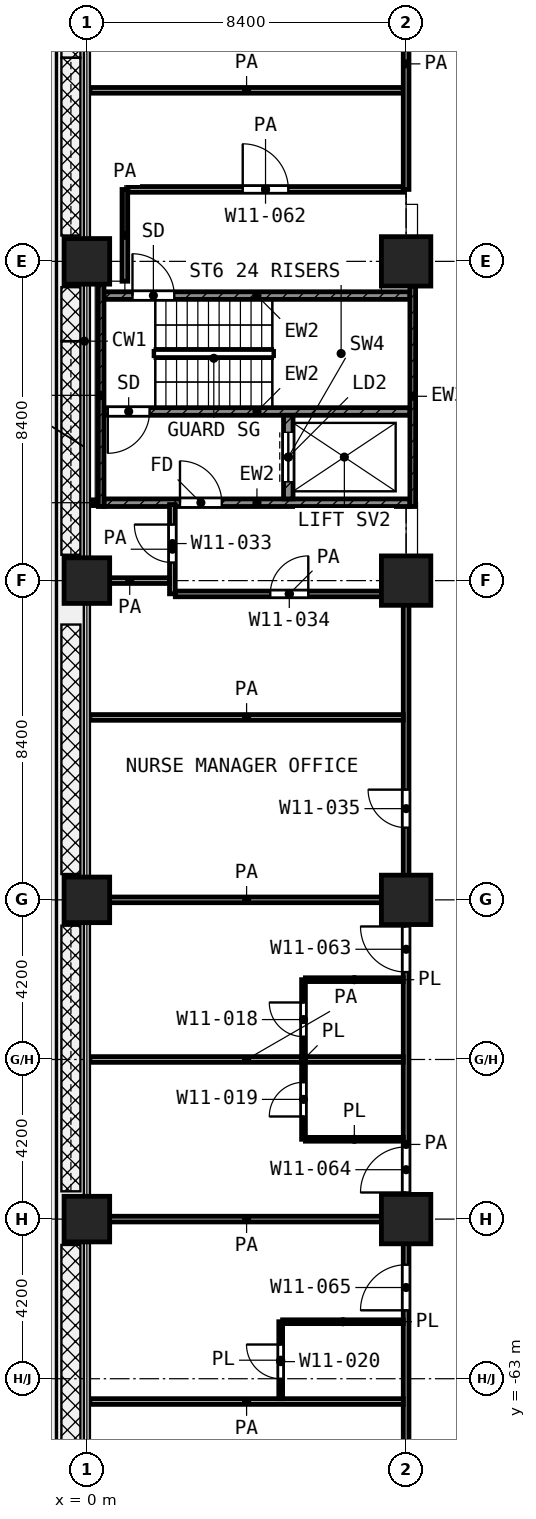
"""IFC4 building model, lengths in metres.
Left out: names, types, materials, properties, quantities, classifications, styles, units other than length and angle.
Written with IfcOpenShell. Run it as: python <this file> out.ifc"""

import sys

from ifc_helpers import new_model, si_unit, direction, frame, frame_2d, origin, origin_2d, place, context, subcontext, project, spatial, rectangle, extrude, element, fill, save


model = new_model("IFC4")
c1 = context("Model", 3, precision=1e-05, world=origin(), true_north=direction((0.0, 1.0)))
c2 = subcontext(c1, "Body", "Model", "MODEL_VIEW")
j1 = project(units=[si_unit("LENGTHUNIT", "METRE"), si_unit("PLANEANGLEUNIT", "RADIAN")], contexts=[c1])
p1 = place(None, origin())
s1 = spatial("IfcSite", under=j1, at=p1, CompositionType="ELEMENT")
p2 = place(p1, origin())
s2 = spatial("IfcBuilding", under=s1, at=p2, CompositionType="ELEMENT")
p3 = place(p2, frame((0.0, 0.0, 72.8)))
s3 = spatial("IfcBuildingStorey", under=s2, at=p3, CompositionType="ELEMENT", Elevation=72.8)
p4 = place(p3, frame((0.0, -33.6, 0.0), z_axis=(0.0, 0.0, 1.0), x_axis=(1.0, 0.0, 0.0)))
e1 = element("IfcColumn", 1, at=p4, inside=s3, PredefinedType="COLUMN", context=c2, shape_type="SweptSolid", body=[
    extrude(rectangle(XDim=1.2, YDim=1.2, at=origin_2d()), origin(), (0.0, 0.0, 1.0), 4.2),
])
p5 = place(p3, frame((8.4, -33.6, 0.0), z_axis=(0.0, 0.0, 1.0), x_axis=(1.0, 0.0, 0.0)))
e2 = element("IfcColumn", 2, at=p5, inside=s3, PredefinedType="COLUMN", context=c2, shape_type="SweptSolid", body=[
    extrude(rectangle(XDim=1.3, YDim=1.3, at=origin_2d()), origin(), (0.0, 0.0, 1.0), 4.2),
])
p6 = place(p3, frame((0.0, -42.0, 0.0), z_axis=(0.0, 0.0, 1.0), x_axis=(1.0, 0.0, 0.0)))
e3 = element("IfcColumn", 3, at=p6, inside=s3, PredefinedType="COLUMN", context=c2, shape_type="SweptSolid", body=[
    extrude(rectangle(XDim=1.2, YDim=1.2, at=origin_2d()), origin(), (0.0, 0.0, 1.0), 4.2),
])
p7 = place(p3, frame((8.4, -42.0, 0.0), z_axis=(0.0, 0.0, 1.0), x_axis=(1.0, 0.0, 0.0)))
e4 = element("IfcColumn", 4, at=p7, inside=s3, PredefinedType="COLUMN", context=c2, shape_type="SweptSolid", body=[
    extrude(rectangle(XDim=1.3, YDim=1.3, at=origin_2d()), origin(), (0.0, 0.0, 1.0), 4.2),
])
p8 = place(p3, frame((0.0, -50.4, 0.0), z_axis=(0.0, 0.0, 1.0), x_axis=(1.0, 0.0, 0.0)))
e5 = element("IfcColumn", 5, at=p8, inside=s3, PredefinedType="COLUMN", context=c2, shape_type="SweptSolid", body=[
    extrude(rectangle(XDim=1.2, YDim=1.2, at=origin_2d()), origin(), (0.0, 0.0, 1.0), 4.2),
])
p9 = place(p3, frame((8.4, -50.4, 0.0), z_axis=(0.0, 0.0, 1.0), x_axis=(1.0, 0.0, 0.0)))
e6 = element("IfcColumn", 6, at=p9, inside=s3, PredefinedType="COLUMN", context=c2, shape_type="SweptSolid", body=[
    extrude(rectangle(XDim=1.3, YDim=1.3, at=origin_2d()), origin(), (0.0, 0.0, 1.0), 4.2),
])
p10 = place(p3, frame((0.0, -58.8, 0.0), z_axis=(0.0, 0.0, 1.0), x_axis=(1.0, 0.0, 0.0)))
e7 = element("IfcColumn", 7, at=p10, inside=s3, PredefinedType="COLUMN", context=c2, shape_type="SweptSolid", body=[
    extrude(rectangle(XDim=1.2, YDim=1.2, at=origin_2d()), origin(), (0.0, 0.0, 1.0), 4.2),
])
p11 = place(p3, frame((8.4, -58.8, 0.0), z_axis=(0.0, 0.0, 1.0), x_axis=(1.0, 0.0, 0.0)))
e8 = element("IfcColumn", 8, at=p11, inside=s3, PredefinedType="COLUMN", context=c2, shape_type="SweptSolid", body=[
    extrude(rectangle(XDim=1.3, YDim=1.3, at=origin_2d()), origin(), (0.0, 0.0, 1.0), 4.2),
])
p12 = place(p3, frame((0.375, -40.05, 0.0), z_axis=(0.0, 0.0, 1.0), x_axis=(0.0, 1.0, 0.0)))
e9 = element("IfcWall", 9, at=p12, inside=s3, PredefinedType="SHEAR", context=c2, shape_type="SweptSolid", body=[
    extrude(rectangle(XDim=5.85, YDim=0.15, at=frame_2d((2.925, 0.0))), origin(), (0.0, 0.0, 1.0), 3.9),
])
p13 = place(p3, frame((8.575, -40.05, 0.0), z_axis=(0.0, 0.0, 1.0), x_axis=(0.0, 1.0, 0.0)))
e10 = element("IfcWall", 10, at=p13, inside=s3, PredefinedType="SHEAR", context=c2, shape_type="SweptSolid", body=[
    extrude(rectangle(XDim=5.8, YDim=0.15, at=frame_2d((2.9, 0.0))), origin(), (0.0, 0.0, 1.0), 3.9),
])
p14 = place(p3, frame((0.45, -34.5, 0.0), z_axis=(0.0, 0.0, 1.0), x_axis=(1.0, 0.0, 0.0)))
e11 = element("IfcWall", 11, at=p14, inside=s3, PredefinedType="SHEAR", context=c2, shape_type="SweptSolid", body=[
    extrude(rectangle(XDim=8.05, YDim=0.2, at=frame_2d((4.025, 0.0))), origin(), (0.0, 0.0, 1.0), 3.9),
])
p15 = place(p14, frame((0.75, 0.0, 0.0)))
e12 = element("IfcOpeningElement", 12, at=p15, cuts=e11, PredefinedType="OPENING", context=c2, shape_type="SweptSolid", body=[
    extrude(rectangle(XDim=1.1, YDim=2.1, at=frame_2d((0.55, 1.05))), frame((0.0, 0.11, 0.0), z_axis=(0.0, -1.0, 0.0), x_axis=(1.0, 0.0, 0.0)), (0.0, 0.0, 1.0), 0.22),
])
p16 = place(p3, frame((0.45, -37.55, 0.0), z_axis=(0.0, 0.0, 1.0), x_axis=(1.0, 0.0, 0.0)))
e13 = element("IfcWall", 13, at=p16, inside=s3, PredefinedType="SHEAR", context=c2, shape_type="SweptSolid", body=[
    extrude(rectangle(XDim=8.05, YDim=0.2, at=frame_2d((4.025, 0.0))), origin(), (0.0, 0.0, 1.0), 3.9),
])
p17 = place(p16, frame((0.1, 0.0, 0.0)))
e14 = element("IfcOpeningElement", 14, at=p17, cuts=e13, PredefinedType="OPENING", context=c2, shape_type="SweptSolid", body=[
    extrude(rectangle(XDim=1.1, YDim=2.1, at=frame_2d((0.55, 1.05))), frame((0.0, 0.11, 0.0), z_axis=(0.0, -1.0, 0.0), x_axis=(1.0, 0.0, 0.0)), (0.0, 0.0, 1.0), 0.22),
])
p18 = place(p3, frame((0.45, -39.95, 0.0), z_axis=(0.0, 0.0, 1.0), x_axis=(1.0, 0.0, 0.0)))
e15 = element("IfcWall", 15, at=p18, inside=s3, PredefinedType="SHEAR", context=c2, shape_type="SweptSolid", body=[
    extrude(rectangle(XDim=8.05, YDim=0.2, at=frame_2d((4.025, 0.0))), origin(), (0.0, 0.0, 1.0), 3.9),
])
p19 = place(p18, frame((2.0, 0.0, 0.0)))
e16 = element("IfcOpeningElement", 16, at=p19, cuts=e15, PredefinedType="OPENING", context=c2, shape_type="SweptSolid", body=[
    extrude(rectangle(XDim=1.1, YDim=2.1, at=frame_2d((0.55, 1.05))), frame((0.0, 0.11, 0.0), z_axis=(0.0, -1.0, 0.0), x_axis=(1.0, 0.0, 0.0)), (0.0, 0.0, 1.0), 0.22),
])
p20 = place(p3, frame((5.3, -39.85, 0.0), z_axis=(0.0, 0.0, 1.0), x_axis=(0.0, 1.0, 0.0)))
e17 = element("IfcWall", 17, at=p20, inside=s3, PredefinedType="SHEAR", context=c2, shape_type="SweptSolid", body=[
    extrude(rectangle(XDim=2.2, YDim=0.25, at=frame_2d((1.1, 0.0))), origin(), (0.0, 0.0, 1.0), 3.9),
])
p21 = place(p20, frame((0.45, 0.0, 0.0)))
e18 = element("IfcOpeningElement", 18, at=p21, cuts=e17, PredefinedType="OPENING", context=c2, shape_type="SweptSolid", body=[
    extrude(rectangle(XDim=1.3, YDim=2.1, at=frame_2d((0.65, 1.05))), frame((0.0, 0.135, 0.0), z_axis=(0.0, -1.0, 0.0), x_axis=(1.0, 0.0, 0.0)), (0.0, 0.0, 1.0), 0.27),
])
p22 = place(p3, frame((5.15, -61.5, 0.0), z_axis=(0.0, 0.0, 1.0), x_axis=(1.0, 0.0, 0.0)))
e19 = element("IfcWall", 19, at=p22, inside=s3, PredefinedType="PARTITIONING", context=c2, shape_type="SweptSolid", body=[
    extrude(rectangle(XDim=3.175, YDim=0.1, at=frame_2d((1.587, 0.0))), origin(), (0.0, 0.0, 1.0), 3.9),
])
for number, where, z_axis, x_axis in (
    (20, (5.75, -56.7, 0.0), (0.0, 0.0, 1.0), (1.0, 0.0, 0.0)),
    (21, (5.75, -52.5, 0.0), (0.0, 0.0, 1.0), (1.0, 0.0, 0.0)),
):
    element("IfcWall", number, at=place(p3, frame(where, z_axis=z_axis, x_axis=x_axis)), inside=s3, PredefinedType="PARTITIONING", context=c2, shape_type="SweptSolid", body=[
        extrude(rectangle(XDim=2.575, YDim=0.1, at=frame_2d((1.288, 0.0))), origin(), (0.0, 0.0, 1.0), 3.9),
    ])
p23 = place(p3, frame((5.1, -63.525, 0.0), z_axis=(0.0, 0.0, 1.0), x_axis=(0.0, 1.0, 0.0)))
e22 = element("IfcWall", 22, at=p23, inside=s3, PredefinedType="PARTITIONING", context=c2, shape_type="SweptSolid", body=[
    extrude(rectangle(XDim=2.025, YDim=0.1, at=frame_2d((1.012, 0.0))), origin(), (0.0, 0.0, 1.0), 3.9),
])
p24 = place(p23, frame((0.525, 0.0, 0.0)))
e23 = element("IfcOpeningElement", 23, at=p24, cuts=e22, PredefinedType="OPENING", context=c2, shape_type="SweptSolid", body=[
    extrude(rectangle(XDim=0.9, YDim=2.1, at=frame_2d((0.45, 1.05))), frame((0.0, 0.06, 0.0), z_axis=(0.0, -1.0, 0.0), x_axis=(1.0, 0.0, 0.0)), (0.0, 0.0, 1.0), 0.12),
])
p25 = place(p3, frame((5.7, -56.7, 0.0), z_axis=(0.0, 0.0, 1.0), x_axis=(0.0, 1.0, 0.0)))
e24 = element("IfcWall", 24, at=p25, inside=s3, PredefinedType="PARTITIONING", context=c2, shape_type="SweptSolid", body=[
    extrude(rectangle(XDim=4.2, YDim=0.1, at=frame_2d((2.1, 0.0))), origin(), (0.0, 0.0, 1.0), 3.9),
])
p26 = place(p25, frame((2.7, 0.0, 0.0)))
e25 = element("IfcOpeningElement", 25, at=p26, cuts=e24, PredefinedType="OPENING", context=c2, shape_type="SweptSolid", body=[
    extrude(rectangle(XDim=0.9, YDim=2.1, at=frame_2d((0.45, 1.05))), frame((0.0, 0.06, 0.0), z_axis=(0.0, -1.0, 0.0), x_axis=(1.0, 0.0, 0.0)), (0.0, 0.0, 1.0), 0.12),
])
p27 = place(p25, frame((0.6, 0.0, 0.0)))
e26 = element("IfcOpeningElement", 26, at=p27, cuts=e24, PredefinedType="OPENING", context=c2, shape_type="SweptSolid", body=[
    extrude(rectangle(XDim=0.9, YDim=2.1, at=frame_2d((0.45, 1.05))), frame((0.0, 0.06, 0.0), z_axis=(0.0, -1.0, 0.0), x_axis=(1.0, 0.0, 0.0)), (0.0, 0.0, 1.0), 0.12),
])
for number, where, z_axis, x_axis in (
    (27, (0.08, -63.6, 0.0), (0.0, 0.0, 1.0), (1.0, 0.0, 0.0)),
    (28, (0.08, -58.8, 0.0), (0.0, 0.0, 1.0), (1.0, 0.0, 0.0)),
    (29, (0.08, -54.6, 0.0), (0.0, 0.0, 1.0), (1.0, 0.0, 0.0)),
    (30, (0.08, -50.4, 0.0), (0.0, 0.0, 1.0), (1.0, 0.0, 0.0)),
    (31, (0.08, -45.6, 0.0), (0.0, 0.0, 1.0), (1.0, 0.0, 0.0)),
):
    element("IfcWall", number, at=place(p3, frame(where, z_axis=z_axis, x_axis=x_axis)), inside=s3, PredefinedType="PARTITIONING", context=c2, shape_type="SweptSolid", body=[
        extrude(rectangle(XDim=8.245, YDim=0.15, at=frame_2d((4.123, 0.0))), origin(), (0.0, 0.0, 1.0), 3.9),
    ])
p28 = place(p3, frame((2.327, -42.35, 0.0), z_axis=(0.0, 0.0, 1.0), x_axis=(1.0, 0.0, 0.0)))
e32 = element("IfcWall", 32, at=p28, inside=s3, PredefinedType="PARTITIONING", context=c2, shape_type="SweptSolid", body=[
    extrude(rectangle(XDim=5.998, YDim=0.15, at=frame_2d((2.999, 0.0))), origin(), (0.0, 0.0, 1.0), 3.9),
])
p29 = place(p28, frame((2.499, 0.0, 0.0)))
e33 = element("IfcOpeningElement", 33, at=p29, cuts=e32, PredefinedType="OPENING", context=c2, shape_type="SweptSolid", body=[
    extrude(rectangle(XDim=1.0, YDim=2.1, at=frame_2d((0.5, 1.05))), frame((0.0, 0.085, 0.0), z_axis=(0.0, -1.0, 0.0), x_axis=(1.0, 0.0, 0.0)), (0.0, 0.0, 1.0), 0.17),
])
p30 = place(p3, frame((0.08, -42.0, 0.0), z_axis=(0.0, 0.0, 1.0), x_axis=(1.0, 0.0, 0.0)))
e34 = element("IfcWall", 34, at=p30, inside=s3, PredefinedType="PARTITIONING", context=c2, shape_type="SweptSolid", body=[
    extrude(rectangle(XDim=2.095, YDim=0.15, at=frame_2d((1.047, 0.0))), origin(), (0.0, 0.0, 1.0), 3.9),
])
p31 = place(p3, frame((0.08, -39.95, 0.0), z_axis=(0.0, 0.0, 1.0), x_axis=(1.0, 0.0, 0.0)))
e35 = element("IfcWall", 35, at=p31, inside=s3, PredefinedType="PARTITIONING", context=c2, shape_type="SweptSolid", body=[
    extrude(rectangle(XDim=0.19, YDim=0.15, at=frame_2d((0.095, 0.0))), origin(), (0.0, 0.0, 1.0), 3.9),
])
p32 = place(p3, frame((1.077, -31.707, 0.0), z_axis=(0.0, 0.0, 1.0), x_axis=(1.0, 0.0, 0.0)))
e36 = element("IfcWall", 36, at=p32, inside=s3, PredefinedType="PARTITIONING", context=c2, shape_type="SweptSolid", body=[
    extrude(rectangle(XDim=7.248, YDim=0.15, at=frame_2d((3.624, 0.0))), origin(), (0.0, 0.0, 1.0), 3.9),
])
p33 = place(p32, frame((3.024, 0.0, 0.0)))
e37 = element("IfcOpeningElement", 37, at=p33, cuts=e36, PredefinedType="OPENING", context=c2, shape_type="SweptSolid", body=[
    extrude(rectangle(XDim=1.2, YDim=2.1, at=frame_2d((0.6, 1.05))), frame((0.0, 0.085, 0.0), z_axis=(0.0, -1.0, 0.0), x_axis=(1.0, 0.0, 0.0)), (0.0, 0.0, 1.0), 0.17),
])
p34 = place(p3, frame((0.08, -29.1, 0.0), z_axis=(0.0, 0.0, 1.0), x_axis=(1.0, 0.0, 0.0)))
e38 = element("IfcWall", 38, at=p34, inside=s3, PredefinedType="PARTITIONING", context=c2, shape_type="SweptSolid", body=[
    extrude(rectangle(XDim=8.245, YDim=0.15, at=frame_2d((4.123, 0.0))), origin(), (0.0, 0.0, 1.0), 3.9),
])
p35 = place(p3, frame((1.0, -34.123, 0.0), z_axis=(0.0, 0.0, 1.0), x_axis=(0.0, 1.0, 0.0)))
e39 = element("IfcWall", 39, at=p35, inside=s3, PredefinedType="PARTITIONING", context=c2, shape_type="SweptSolid", body=[
    extrude(rectangle(XDim=2.415, YDim=0.15, at=frame_2d((1.208, 0.0))), origin(), (0.0, 0.0, 1.0), 3.9),
])
p36 = place(p3, frame((2.25, -42.348, 0.0), z_axis=(0.0, 0.0, 1.0), x_axis=(0.0, 1.0, 0.0)))
e40 = element("IfcWall", 40, at=p36, inside=s3, PredefinedType="PARTITIONING", context=c2, shape_type="SweptSolid", body=[
    extrude(rectangle(XDim=2.348, YDim=0.15, at=frame_2d((1.174, 0.0))), origin(), (0.0, 0.0, 1.0), 3.9),
])
p37 = place(p36, frame((0.823, 0.0, 0.0)))
e41 = element("IfcOpeningElement", 41, at=p37, cuts=e40, PredefinedType="OPENING", context=c2, shape_type="SweptSolid", body=[
    extrude(rectangle(XDim=1.0, YDim=2.1, at=frame_2d((0.5, 1.05))), frame((0.0, 0.085, 0.0), z_axis=(0.0, -1.0, 0.0), x_axis=(1.0, 0.0, 0.0)), (0.0, 0.0, 1.0), 0.17),
])
p38 = place(p3, frame((8.4, -71.32, 0.0), z_axis=(0.0, 0.0, 1.0), x_axis=(0.0, 1.0, 0.0)))
e42 = element("IfcWall", 42, at=p38, inside=s3, PredefinedType="PARTITIONING", context=c2, shape_type="SweptSolid", body=[
    extrude(rectangle(XDim=28.97, YDim=0.15, at=frame_2d((14.485, 0.0))), origin(), (0.0, 0.0, 1.0), 3.9),
])
p39 = place(p38, frame((22.82, 0.0, 0.0)))
e43 = element("IfcOpeningElement", 43, at=p39, cuts=e42, PredefinedType="OPENING", context=c2, shape_type="SweptSolid", body=[
    extrude(rectangle(XDim=1.0, YDim=2.1, at=frame_2d((0.5, 1.05))), frame((0.0, 0.085, 0.0), z_axis=(0.0, -1.0, 0.0), x_axis=(1.0, 0.0, 0.0)), (0.0, 0.0, 1.0), 0.17),
])
p40 = place(p38, frame((19.02, 0.0, 0.0)))
e44 = element("IfcOpeningElement", 44, at=p40, cuts=e42, PredefinedType="OPENING", context=c2, shape_type="SweptSolid", body=[
    extrude(rectangle(XDim=1.2, YDim=2.1, at=frame_2d((0.6, 1.05))), frame((0.0, 0.085, 0.0), z_axis=(0.0, -1.0, 0.0), x_axis=(1.0, 0.0, 0.0)), (0.0, 0.0, 1.0), 0.17),
])
p41 = place(p38, frame((13.22, 0.0, 0.0)))
e45 = element("IfcOpeningElement", 45, at=p41, cuts=e42, PredefinedType="OPENING", context=c2, shape_type="SweptSolid", body=[
    extrude(rectangle(XDim=1.2, YDim=2.1, at=frame_2d((0.6, 1.05))), frame((0.0, 0.085, 0.0), z_axis=(0.0, -1.0, 0.0), x_axis=(1.0, 0.0, 0.0)), (0.0, 0.0, 1.0), 0.17),
])
p42 = place(p38, frame((10.12, 0.0, 0.0)))
e46 = element("IfcOpeningElement", 46, at=p42, cuts=e42, PredefinedType="OPENING", context=c2, shape_type="SweptSolid", body=[
    extrude(rectangle(XDim=1.2, YDim=2.1, at=frame_2d((0.6, 1.05))), frame((0.0, 0.085, 0.0), z_axis=(0.0, -1.0, 0.0), x_axis=(1.0, 0.0, 0.0)), (0.0, 0.0, 1.0), 0.17),
])
p43 = place(p38, frame((2.42, 0.0, 0.0)))
e47 = element("IfcOpeningElement", 47, at=p43, cuts=e42, PredefinedType="OPENING", context=c2, shape_type="SweptSolid", body=[
    extrude(rectangle(XDim=1.0, YDim=2.1, at=frame_2d((0.5, 1.05))), frame((0.0, 0.085, 0.0), z_axis=(0.0, -1.0, 0.0), x_axis=(1.0, 0.0, 0.0)), (0.0, 0.0, 1.0), 0.17),
])
p44 = place(p3, frame((8.4, -31.707, 0.0), z_axis=(0.0, 0.0, 1.0), x_axis=(0.0, 1.0, 0.0)))
e48 = element("IfcWall", 48, at=p44, inside=s3, PredefinedType="PARTITIONING", context=c2, shape_type="SweptSolid", body=[
    extrude(rectangle(XDim=6.607, YDim=0.15, at=frame_2d((3.303, 0.0))), origin(), (0.0, 0.0, 1.0), 3.9),
])
p45 = place(p44, frame((4.107, 0.0, 0.0)))
e49 = element("IfcOpeningElement", 49, at=p45, cuts=e48, PredefinedType="OPENING", context=c2, shape_type="SweptSolid", body=[
    extrude(rectangle(XDim=0.9, YDim=2.1, at=frame_2d((0.45, 1.05))), frame((0.0, 0.085, 0.0), z_axis=(0.0, -1.0, 0.0), x_axis=(1.0, 0.0, 0.0)), (0.0, 0.0, 1.0), 0.17),
])
p46 = place(p15, origin())
e50 = element("IfcDoor", 50, at=p46, inside=s3, OperationType="SINGLE_SWING_LEFT", PredefinedType="DOOR", context=c2, shape_type="SweptSolid", body=[
    extrude(rectangle(XDim=1.1, YDim=2.1, at=frame_2d((0.55, 1.05))), frame((0.0, 0.025, 0.0), z_axis=(0.0, -1.0, 0.0), x_axis=(1.0, 0.0, 0.0)), (0.0, 0.0, 1.0), 0.05),
])
fill(e12, e50)
p47 = place(p17, frame((1.1, 0.0, 0.0), z_axis=(0.0, 0.0, 1.0), x_axis=(-1.0, 0.0, 0.0)))
e51 = element("IfcDoor", 51, at=p47, inside=s3, OperationType="SINGLE_SWING_LEFT", PredefinedType="DOOR", context=c2, shape_type="SweptSolid", body=[
    extrude(rectangle(XDim=1.1, YDim=2.1, at=frame_2d((0.55, 1.05))), frame((0.0, 0.025, 0.0), z_axis=(0.0, -1.0, 0.0), x_axis=(1.0, 0.0, 0.0)), (0.0, 0.0, 1.0), 0.05),
])
fill(e14, e51)
p48 = place(p21, origin())
e52 = element("IfcDoor", 52, at=p48, inside=s3, OperationType="DOUBLE_DOOR_SLIDING", PredefinedType="DOOR", context=c2, shape_type="SweptSolid", body=[
    extrude(rectangle(XDim=1.3, YDim=2.1, at=frame_2d((0.65, 1.05))), frame((0.0, 0.025, 0.0), z_axis=(0.0, -1.0, 0.0), x_axis=(1.0, 0.0, 0.0)), (0.0, 0.0, 1.0), 0.05),
])
fill(e18, e52)
p49 = place(p19, origin())
e53 = element("IfcDoor", 53, at=p49, inside=s3, OperationType="SINGLE_SWING_LEFT", PredefinedType="DOOR", context=c2, shape_type="SweptSolid", body=[
    extrude(rectangle(XDim=1.1, YDim=2.1, at=frame_2d((0.55, 1.05))), frame((0.0, 0.025, 0.0), z_axis=(0.0, -1.0, 0.0), x_axis=(1.0, 0.0, 0.0)), (0.0, 0.0, 1.0), 0.05),
])
fill(e16, e53)
p50 = place(p33, origin())
e54 = element("IfcDoor", 54, at=p50, inside=s3, OperationType="SINGLE_SWING_LEFT", PredefinedType="DOOR", context=c2, shape_type="SweptSolid", body=[
    extrude(rectangle(XDim=1.2, YDim=2.1, at=frame_2d((0.6, 1.05))), frame((0.0, 0.025, 0.0), z_axis=(0.0, -1.0, 0.0), x_axis=(1.0, 0.0, 0.0)), (0.0, 0.0, 1.0), 0.05),
])
fill(e37, e54)
p51 = place(p37, origin())
e55 = element("IfcDoor", 55, at=p51, inside=s3, OperationType="SINGLE_SWING_RIGHT", PredefinedType="DOOR", context=c2, shape_type="SweptSolid", body=[
    extrude(rectangle(XDim=1.0, YDim=2.1, at=frame_2d((0.5, 1.05))), frame((0.0, 0.025, 0.0), z_axis=(0.0, -1.0, 0.0), x_axis=(1.0, 0.0, 0.0)), (0.0, 0.0, 1.0), 0.05),
])
fill(e41, e55)
p52 = place(p29, origin())
e56 = element("IfcDoor", 56, at=p52, inside=s3, OperationType="SINGLE_SWING_RIGHT", PredefinedType="DOOR", context=c2, shape_type="SweptSolid", body=[
    extrude(rectangle(XDim=1.0, YDim=2.1, at=frame_2d((0.5, 1.05))), frame((0.0, 0.025, 0.0), z_axis=(0.0, -1.0, 0.0), x_axis=(1.0, 0.0, 0.0)), (0.0, 0.0, 1.0), 0.05),
])
fill(e33, e56)
p53 = place(p39, origin())
e57 = element("IfcDoor", 57, at=p53, inside=s3, OperationType="SINGLE_SWING_RIGHT", PredefinedType="DOOR", context=c2, shape_type="SweptSolid", body=[
    extrude(rectangle(XDim=1.0, YDim=2.1, at=frame_2d((0.5, 1.05))), frame((0.0, 0.025, 0.0), z_axis=(0.0, -1.0, 0.0), x_axis=(1.0, 0.0, 0.0)), (0.0, 0.0, 1.0), 0.05),
])
fill(e43, e57)
p54 = place(p40, origin())
e58 = element("IfcDoor", 58, at=p54, inside=s3, OperationType="SINGLE_SWING_RIGHT", PredefinedType="DOOR", context=c2, shape_type="SweptSolid", body=[
    extrude(rectangle(XDim=1.2, YDim=2.1, at=frame_2d((0.6, 1.05))), frame((0.0, 0.025, 0.0), z_axis=(0.0, -1.0, 0.0), x_axis=(1.0, 0.0, 0.0)), (0.0, 0.0, 1.0), 0.05),
])
fill(e44, e58)
p55 = place(p26, origin())
e59 = element("IfcDoor", 59, at=p55, inside=s3, OperationType="SINGLE_SWING_RIGHT", PredefinedType="DOOR", context=c2, shape_type="SweptSolid", body=[
    extrude(rectangle(XDim=0.9, YDim=2.1, at=frame_2d((0.45, 1.05))), frame((0.0, 0.025, 0.0), z_axis=(0.0, -1.0, 0.0), x_axis=(1.0, 0.0, 0.0)), (0.0, 0.0, 1.0), 0.05),
])
fill(e25, e59)
p56 = place(p41, origin())
e60 = element("IfcDoor", 60, at=p56, inside=s3, OperationType="SINGLE_SWING_LEFT", PredefinedType="DOOR", context=c2, shape_type="SweptSolid", body=[
    extrude(rectangle(XDim=1.2, YDim=2.1, at=frame_2d((0.6, 1.05))), frame((0.0, 0.025, 0.0), z_axis=(0.0, -1.0, 0.0), x_axis=(1.0, 0.0, 0.0)), (0.0, 0.0, 1.0), 0.05),
])
fill(e45, e60)
p57 = place(p27, origin())
e61 = element("IfcDoor", 61, at=p57, inside=s3, OperationType="SINGLE_SWING_LEFT", PredefinedType="DOOR", context=c2, shape_type="SweptSolid", body=[
    extrude(rectangle(XDim=0.9, YDim=2.1, at=frame_2d((0.45, 1.05))), frame((0.0, 0.025, 0.0), z_axis=(0.0, -1.0, 0.0), x_axis=(1.0, 0.0, 0.0)), (0.0, 0.0, 1.0), 0.05),
])
fill(e26, e61)
p58 = place(p42, origin())
e62 = element("IfcDoor", 62, at=p58, inside=s3, OperationType="SINGLE_SWING_LEFT", PredefinedType="DOOR", context=c2, shape_type="SweptSolid", body=[
    extrude(rectangle(XDim=1.2, YDim=2.1, at=frame_2d((0.6, 1.05))), frame((0.0, 0.025, 0.0), z_axis=(0.0, -1.0, 0.0), x_axis=(1.0, 0.0, 0.0)), (0.0, 0.0, 1.0), 0.05),
])
fill(e46, e62)
p59 = place(p24, origin())
e63 = element("IfcDoor", 63, at=p59, inside=s3, OperationType="SINGLE_SWING_RIGHT", PredefinedType="DOOR", context=c2, shape_type="SweptSolid", body=[
    extrude(rectangle(XDim=0.9, YDim=2.1, at=frame_2d((0.45, 1.05))), frame((0.0, 0.025, 0.0), z_axis=(0.0, -1.0, 0.0), x_axis=(1.0, 0.0, 0.0)), (0.0, 0.0, 1.0), 0.05),
])
fill(e23, e63)
save(model, sys.argv[1])
